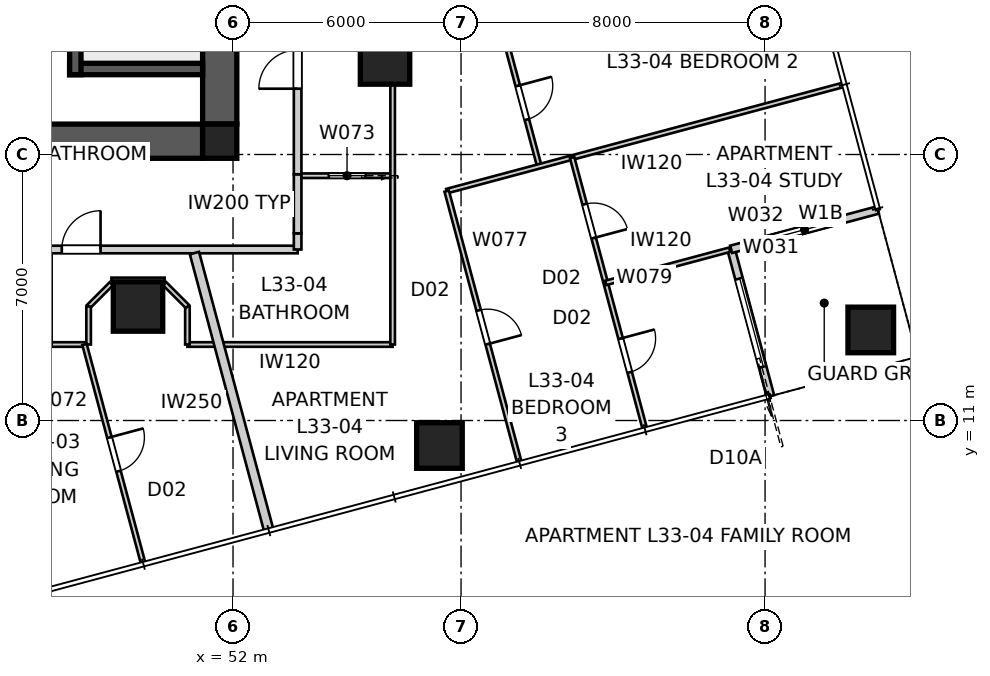
"""IFC4 building model, lengths in metres.
Left out: names, types, materials, properties, quantities, classifications, styles, units other than length and angle.
Written with IfcOpenShell. Run it as: python <this file> out.ifc"""

import sys

from ifc_helpers import new_model, si_unit, direction, frame, frame_2d, origin, origin_2d, place, context, subcontext, project, spatial, polyline, rectangle, outline, extrude, element, fill, save


model = new_model("IFC4")
c1 = context("Model", 3, precision=1e-05, world=origin(), true_north=direction((0.0, 1.0)))
c2 = subcontext(c1, "Body", "Model", "MODEL_VIEW")
j1 = project(units=[si_unit("LENGTHUNIT", "METRE"), si_unit("PLANEANGLEUNIT", "RADIAN")], contexts=[c1])
p1 = place(None, origin())
s1 = spatial("IfcSite", under=j1, at=p1, CompositionType="ELEMENT")
p2 = place(p1, origin())
s2 = spatial("IfcBuilding", under=s1, at=p2, CompositionType="ELEMENT")
p3 = place(p2, frame((0.0, 0.0, 121.8)))
s3 = spatial("IfcBuildingStorey", under=s2, at=p3, CompositionType="ELEMENT", Elevation=121.8)
p4 = place(p3, frame((51.2, 18.35, 0.0), z_axis=(0.0, 0.0, 1.0), x_axis=(-1.0, 0.0, 0.0)))
e1 = element("IfcWall", 1, at=p4, inside=s3, PredefinedType="SHEAR", context=c2, shape_type="SweptSolid", body=[
    extrude(outline(polyline([(0.0, -0.45), (22.4, -0.45), (22.4, -0.025), (22.85, -0.025), (22.85, 0.025), (22.4, 0.025), (22.4, 0.45), (0.0, 0.45), (0.0, 0.025), (-0.45, 0.025), (-0.45, -0.025), (0.0, -0.025), (0.0, -0.45)])), origin(), (0.0, 0.0, 1.0), 3.4),
])
p5 = place(p3, frame((51.65, 18.8, 0.0), z_axis=(0.0, 0.0, 1.0), x_axis=(0.0, 1.0, 0.0)))
e2 = element("IfcWall", 2, at=p5, inside=s3, PredefinedType="SHEAR", context=c2, shape_type="SweptSolid", body=[
    extrude(outline(polyline([(0.0, -0.45), (22.4, -0.45), (22.4, -0.025), (22.85, -0.025), (22.85, 0.025), (22.4, 0.025), (22.4, 0.45), (0.0, 0.45), (0.0, 0.025), (-0.45, 0.025), (-0.45, -0.025), (0.0, -0.025), (0.0, -0.45)])), origin(), (0.0, 0.0, 1.0), 3.4),
])
p6 = place(p5, frame((11.14, 0.0, 0.0)))
e3 = element("IfcOpeningElement", 3, at=p6, cuts=e2, PredefinedType="OPENING", context=c2, shape_type="SweptSolid", body=[
    extrude(rectangle(XDim=1.02, YDim=2.4, at=frame_2d((0.51, 1.2))), frame((0.0, 0.46, 0.0), z_axis=(0.0, -1.0, 0.0), x_axis=(1.0, 0.0, 0.0)), (0.0, 0.0, 1.0), 0.92),
])
p7 = place(p3, frame((47.85, 27.8, 0.0), z_axis=(0.0, 0.0, 1.0), x_axis=(0.0, -1.0, 0.0)))
e4 = element("IfcWall", 4, at=p7, inside=s3, PredefinedType="SHEAR", context=c2, shape_type="SweptSolid", body=[
    extrude(rectangle(XDim=7.7, YDim=0.3, at=frame_2d((3.85, 0.0))), origin(), (0.0, 0.0, 1.0), 3.4),
])
p8 = place(p3, frame((51.2, 20.25, 0.0), z_axis=(0.0, 0.0, 1.0), x_axis=(-1.0, 0.0, 0.0)))
e5 = element("IfcWall", 5, at=p8, inside=s3, PredefinedType="SHEAR", context=c2, shape_type="SweptSolid", body=[
    extrude(rectangle(XDim=3.5, YDim=0.3, at=frame_2d((1.75, 0.0))), origin(), (0.0, 0.0, 1.0), 3.4),
])
p9 = place(p3, frame((51.65, 18.35, 0.0), z_axis=(0.0, 0.0, 1.0), x_axis=(1.0, 0.0, 0.0)))
e6 = element("IfcColumn", 6, at=p9, inside=s3, PredefinedType="COLUMN", context=c2, shape_type="SweptSolid", body=[
    extrude(rectangle(XDim=0.9, YDim=0.9, at=origin_2d()), origin(), (0.0, 0.0, 1.0), 3.4),
])
for number, where, z_axis, x_axis in (
    (7, (57.432, 10.342, 0.0), (0.0, 0.0, 1.0), (1.0, 0.0, 0.0)),
    (8, (68.781, 13.383, 0.0), (0.0, 0.0, 1.0), (1.0, 0.0, 0.0)),
):
    element("IfcColumn", number, at=place(p3, frame(where, z_axis=z_axis, x_axis=x_axis)), inside=s3, PredefinedType="COLUMN", context=c2, shape_type="SweptSolid", body=[
        extrude(rectangle(XDim=1.2, YDim=1.2, at=origin_2d()), origin(), (0.0, 0.0, 1.0), 3.4),
    ])
for number, where, z_axis, x_axis in (
    (9, (49.5, 14.0, 0.0), (0.0, 0.0, 1.0), (1.0, 0.0, 0.0)),
    (10, (56.0, 20.5, 0.0), (0.0, 0.0, 1.0), (1.0, 0.0, 0.0)),
):
    element("IfcColumn", number, at=place(p3, frame(where, z_axis=z_axis, x_axis=x_axis)), inside=s3, PredefinedType="COLUMN", context=c2, shape_type="SweptSolid", body=[
        extrude(rectangle(XDim=1.3, YDim=1.3, at=origin_2d()), origin(), (0.0, 0.0, 1.0), 3.4),
    ])
p10 = place(p3, frame((66.143, 11.641, 0.0), z_axis=(0.0, 0.0, 1.0), x_axis=(-0.258843877716, 0.965919172068, 0.0)))
e11 = element("IfcWall", 11, at=p10, inside=s3, PredefinedType="SOLIDWALL", context=c2, shape_type="SweptSolid", body=[
    extrude(rectangle(XDim=4.0, YDim=0.2, at=frame_2d((2.0, 0.0))), origin(), (0.0, 0.0, 1.0), 3.25),
])
p11 = place(p10, frame((0.8, 0.0, 0.0)))
e12 = element("IfcOpeningElement", 12, at=p11, cuts=e11, PredefinedType="OPENING", context=c2, shape_type="SweptSolid", body=[
    extrude(rectangle(XDim=2.4, YDim=2.1, at=frame_2d((1.2, 1.05))), frame((0.0, 0.11, 0.0), z_axis=(0.0, -1.0, 0.0), x_axis=(1.0, 0.0, 0.0)), (0.0, 0.0, 1.0), 0.22),
])
p12 = place(p3, frame((65.107, 15.504, 0.0), z_axis=(0.0, 0.0, 1.0), x_axis=(0.965934430412, 0.258786931944, 0.0)))
e13 = element("IfcWall", 13, at=p12, inside=s3, PredefinedType="SOLIDWALL", context=c2, shape_type="SweptSolid", body=[
    extrude(rectangle(XDim=4.0, YDim=0.2, at=frame_2d((2.0, 0.0))), origin(), (0.0, 0.0, 1.0), 3.25),
])
p13 = place(p12, frame((1.0, 0.0, 0.45)))
e14 = element("IfcOpeningElement", 14, at=p13, cuts=e13, PredefinedType="OPENING", context=c2, shape_type="SweptSolid", body=[
    extrude(rectangle(XDim=2.0, YDim=1.8, at=frame_2d((1.0, 0.9))), frame((0.0, 0.11, 0.0), z_axis=(0.0, -1.0, 0.0), x_axis=(1.0, 0.0, 0.0)), (0.0, 0.0, 1.0), 0.22),
])
p14 = place(p3, frame((25.5, 15.5, 0.0), z_axis=(0.0, 0.0, 1.0), x_axis=(1.0, 0.0, 0.0)))
e15 = element("IfcWall", 15, at=p14, inside=s3, PredefinedType="PARTITIONING", context=c2, shape_type="SweptSolid", body=[
    extrude(rectangle(XDim=28.2, YDim=0.2, at=frame_2d((14.1, 0.0))), origin(), (0.0, 0.0, 1.0), 3.25),
])
p15 = place(p14, frame((2.244, 0.0, 0.0)))
e16 = element("IfcOpeningElement", 16, at=p15, cuts=e15, PredefinedType="OPENING", context=c2, shape_type="SweptSolid", body=[
    extrude(rectangle(XDim=1.02, YDim=2.1, at=frame_2d((0.51, 1.05))), frame((0.0, 0.11, 0.0), z_axis=(0.0, -1.0, 0.0), x_axis=(1.0, 0.0, 0.0)), (0.0, 0.0, 1.0), 0.22),
])
p16 = place(p14, frame((9.542, 0.0, 0.0)))
e17 = element("IfcOpeningElement", 17, at=p16, cuts=e15, PredefinedType="OPENING", context=c2, shape_type="SweptSolid", body=[
    extrude(rectangle(XDim=1.02, YDim=2.34, at=frame_2d((0.51, 1.17))), frame((0.0, 0.11, 0.0), z_axis=(0.0, -1.0, 0.0), x_axis=(1.0, 0.0, 0.0)), (0.0, 0.0, 1.0), 0.22),
])
p17 = place(p14, frame((21.994, 0.0, 0.0)))
e18 = element("IfcOpeningElement", 18, at=p17, cuts=e15, PredefinedType="OPENING", context=c2, shape_type="SweptSolid", body=[
    extrude(rectangle(XDim=1.02, YDim=2.34, at=frame_2d((0.51, 1.17))), frame((0.0, 0.11, 0.0), z_axis=(0.0, -1.0, 0.0), x_axis=(1.0, 0.0, 0.0)), (0.0, 0.0, 1.0), 0.22),
])
p18 = place(p3, frame((53.7, 15.5, 0.0), z_axis=(0.0, 0.0, 1.0), x_axis=(0.0, 1.0, 0.0)))
e19 = element("IfcWall", 19, at=p18, inside=s3, PredefinedType="PARTITIONING", context=c2, shape_type="SweptSolid", body=[
    extrude(rectangle(XDim=0.426, YDim=0.2, at=frame_2d((0.213, 0.0))), origin(), (0.0, 0.0, 1.0), 3.25),
])
p19 = place(p3, frame((53.7, 15.926, 0.0), z_axis=(0.0, 0.0, 1.0), x_axis=(0.0, 1.0, 0.0)))
e20 = element("IfcWall", 20, at=p19, inside=s3, PredefinedType="PARTITIONING", context=c2, shape_type="SweptSolid", body=[
    extrude(rectangle(XDim=1.554, YDim=0.2, at=frame_2d((0.777, 0.0))), origin(), (0.0, 0.0, 1.0), 2.722),
])
p20 = place(p3, frame((53.7, 17.48, 0.0), z_axis=(0.0, 0.0, 1.0), x_axis=(0.0, 1.0, 0.0)))
e21 = element("IfcWall", 21, at=p20, inside=s3, PredefinedType="PARTITIONING", context=c2, shape_type="SweptSolid", body=[
    extrude(rectangle(XDim=26.22, YDim=0.2, at=frame_2d((13.11, 0.0))), origin(), (0.0, 0.0, 1.0), 3.25),
])
p21 = place(p20, frame((2.252, 0.0, 0.0)))
e22 = element("IfcOpeningElement", 22, at=p21, cuts=e21, PredefinedType="OPENING", context=c2, shape_type="SweptSolid", body=[
    extrude(rectangle(XDim=1.02, YDim=2.34, at=frame_2d((0.51, 1.17))), frame((0.0, 0.11, 0.0), z_axis=(0.0, -1.0, 0.0), x_axis=(1.0, 0.0, 0.0)), (0.0, 0.0, 1.0), 0.22),
])
p22 = place(p20, frame((7.328, 0.0, 0.0)))
e23 = element("IfcOpeningElement", 23, at=p22, cuts=e21, PredefinedType="OPENING", context=c2, shape_type="SweptSolid", body=[
    extrude(rectangle(XDim=1.02, YDim=2.34, at=frame_2d((0.51, 1.17))), frame((0.0, 0.11, 0.0), z_axis=(0.0, -1.0, 0.0), x_axis=(1.0, 0.0, 0.0)), (0.0, 0.0, 1.0), 0.22),
])
p23 = place(p3, frame((52.942, 8.104, 0.0), z_axis=(0.0, 0.0, 1.0), x_axis=(-0.258822171171, 0.965924988656, 0.0)))
e24 = element("IfcWall", 24, at=p23, inside=s3, PredefinedType="PARTITIONING", context=c2, shape_type="SweptSolid", body=[
    extrude(rectangle(XDim=7.56, YDim=0.25, at=frame_2d((3.78, 0.0))), origin(), (0.0, 0.0, 1.0), 3.25),
])
p24 = place(p3, frame((48.144, 13.0, 0.0), z_axis=(0.0, 0.0, 1.0), x_axis=(-1.0, 0.0, 0.0)))
e25 = element("IfcWall", 25, at=p24, inside=s3, PredefinedType="PARTITIONING", context=c2, shape_type="SweptSolid", body=[
    extrude(rectangle(XDim=7.012, YDim=0.12, at=frame_2d((3.506, 0.0))), origin(), (0.0, 0.0, 1.0), 2.55),
])
p25 = place(p24, frame((1.803, 0.0, 0.0)))
e26 = element("IfcOpeningElement", 26, at=p25, cuts=e25, PredefinedType="OPENING", context=c2, shape_type="SweptSolid", body=[
    extrude(rectangle(XDim=0.96, YDim=2.1, at=frame_2d((0.48, 1.05))), frame((0.0, 0.07, 0.0), z_axis=(0.0, -1.0, 0.0), x_axis=(1.0, 0.0, 0.0)), (0.0, 0.0, 1.0), 0.14),
])
p26 = place(p24, frame((4.82, 0.0, 0.0)))
e27 = element("IfcOpeningElement", 27, at=p26, cuts=e25, PredefinedType="OPENING", context=c2, shape_type="SweptSolid", body=[
    extrude(rectangle(XDim=0.96, YDim=2.1, at=frame_2d((0.48, 1.05))), frame((0.0, 0.07, 0.0), z_axis=(0.0, -1.0, 0.0), x_axis=(1.0, 0.0, 0.0)), (0.0, 0.0, 1.0), 0.14),
])
p27 = place(p3, frame((56.2, 13.0, 0.0), z_axis=(0.0, 0.0, 1.0), x_axis=(-1.0, 0.0, 0.0)))
e28 = element("IfcWall", 28, at=p27, inside=s3, PredefinedType="PARTITIONING", context=c2, shape_type="SweptSolid", body=[
    extrude(rectangle(XDim=5.4, YDim=0.12, at=frame_2d((2.7, 0.0))), origin(), (0.0, 0.0, 1.0), 3.25),
])
p28 = place(p3, frame((50.8, 13.0, 0.0), z_axis=(0.0, 0.0, 1.0), x_axis=(0.0, 1.0, 0.0)))
e29 = element("IfcWall", 29, at=p28, inside=s3, PredefinedType="PARTITIONING", context=c2, shape_type="SweptSolid", body=[
    extrude(rectangle(XDim=1.0, YDim=0.12, at=frame_2d((0.5, 0.0))), origin(), (0.0, 0.0, 1.0), 3.25),
])
p29 = place(p3, frame((50.8, 14.0, 0.0), z_axis=(0.0, 0.0, 1.0), x_axis=(-0.707106781187, 0.707106781187, 0.0)))
e30 = element("IfcWall", 30, at=p29, inside=s3, PredefinedType="PARTITIONING", context=c2, shape_type="SweptSolid", body=[
    extrude(rectangle(XDim=0.849, YDim=0.12, at=frame_2d((0.424, 0.0))), origin(), (0.0, 0.0, 1.0), 3.25),
])
p30 = place(p3, frame((50.2, 14.7, 0.0), z_axis=(0.0, 0.0, 1.0), x_axis=(-1.0, 0.0, 0.0)))
e31 = element("IfcWall", 31, at=p30, inside=s3, PredefinedType="PARTITIONING", context=c2, shape_type="SweptSolid", body=[
    extrude(rectangle(XDim=1.4, YDim=0.12, at=frame_2d((0.7, 0.0))), origin(), (0.0, 0.0, 1.0), 3.25),
])
p31 = place(p3, frame((48.8, 14.6, 0.0), z_axis=(0.0, 0.0, 1.0), x_axis=(-0.707106781187, -0.707106781187, 0.0)))
e32 = element("IfcWall", 32, at=p31, inside=s3, PredefinedType="PARTITIONING", context=c2, shape_type="SweptSolid", body=[
    extrude(rectangle(XDim=0.849, YDim=0.12, at=frame_2d((0.424, 0.0))), origin(), (0.0, 0.0, 1.0), 3.25),
])
p32 = place(p3, frame((48.2, 14.0, 0.0), z_axis=(0.0, 0.0, 1.0), x_axis=(0.0, -1.0, 0.0)))
e33 = element("IfcWall", 33, at=p32, inside=s3, PredefinedType="PARTITIONING", context=c2, shape_type="SweptSolid", body=[
    extrude(rectangle(XDim=1.0, YDim=0.12, at=frame_2d((0.5, 0.0))), origin(), (0.0, 0.0, 1.0), 3.25),
])
p33 = place(p3, frame((48.092, 13.0, 0.0), z_axis=(0.0, 0.0, 1.0), x_axis=(0.258812722515, -0.965927520399, 0.0)))
e34 = element("IfcWall", 34, at=p33, inside=s3, PredefinedType="PARTITIONING", context=c2, shape_type="SweptSolid", body=[
    extrude(rectangle(XDim=5.945, YDim=0.12, at=frame_2d((2.972, 0.0))), origin(), (0.0, 0.0, 1.0), 3.25),
])
p34 = place(p33, frame((2.532, 0.0, 0.0)))
e35 = element("IfcOpeningElement", 35, at=p34, cuts=e34, PredefinedType="OPENING", context=c2, shape_type="SweptSolid", body=[
    extrude(rectangle(XDim=0.92, YDim=2.34, at=frame_2d((0.46, 1.17))), frame((0.0, 0.07, 0.0), z_axis=(0.0, -1.0, 0.0), x_axis=(1.0, 0.0, 0.0)), (0.0, 0.0, 1.0), 0.14),
])
p35 = place(p3, frame((56.2, 17.442, 0.0), z_axis=(0.0, 0.0, 1.0), x_axis=(-1.0, 0.0, 0.0)))
e36 = element("IfcWall", 36, at=p35, inside=s3, PredefinedType="PARTITIONING", context=c2, shape_type="SweptSolid", body=[
    extrude(rectangle(XDim=2.4, YDim=0.12, at=frame_2d((1.2, 0.0))), origin(), (0.0, 0.0, 1.0), 3.25),
])
p36 = place(p35, frame((0.72, 0.0, 0.0)))
e37 = element("IfcOpeningElement", 37, at=p36, cuts=e36, PredefinedType="OPENING", context=c2, shape_type="SweptSolid", body=[
    extrude(rectangle(XDim=0.96, YDim=2.1, at=frame_2d((0.48, 1.05))), frame((0.0, 0.07, 0.0), z_axis=(0.0, -1.0, 0.0), x_axis=(1.0, 0.0, 0.0)), (0.0, 0.0, 1.0), 0.14),
])
p37 = place(p3, frame((56.2, 46.2, 0.0), z_axis=(0.0, 0.0, 1.0), x_axis=(0.0, -1.0, 0.0)))
e38 = element("IfcWall", 38, at=p37, inside=s3, PredefinedType="PARTITIONING", context=c2, shape_type="SweptSolid", body=[
    extrude(rectangle(XDim=33.2, YDim=0.12, at=frame_2d((16.6, 0.0))), origin(), (0.0, 0.0, 1.0), 2.55),
])
p38 = place(p37, frame((23.955, 0.0, 0.0)))
e39 = element("IfcOpeningElement", 39, at=p38, cuts=e38, PredefinedType="OPENING", context=c2, shape_type="SweptSolid", body=[
    extrude(rectangle(XDim=0.92, YDim=2.34, at=frame_2d((0.46, 1.17))), frame((0.0, 0.07, 0.0), z_axis=(0.0, -1.0, 0.0), x_axis=(1.0, 0.0, 0.0)), (0.0, 0.0, 1.0), 0.14),
])
p39 = place(p37, frame((20.966, 0.0, 0.0)))
e40 = element("IfcOpeningElement", 40, at=p39, cuts=e38, PredefinedType="OPENING", context=c2, shape_type="SweptSolid", body=[
    extrude(rectangle(XDim=0.92, YDim=2.34, at=frame_2d((0.46, 1.17))), frame((0.0, 0.07, 0.0), z_axis=(0.0, -1.0, 0.0), x_axis=(1.0, 0.0, 0.0)), (0.0, 0.0, 1.0), 0.14),
])
p40 = place(p37, frame((13.174, 0.0, 0.0)))
e41 = element("IfcOpeningElement", 41, at=p40, cuts=e38, PredefinedType="OPENING", context=c2, shape_type="SweptSolid", body=[
    extrude(rectangle(XDim=0.96, YDim=2.1, at=frame_2d((0.48, 1.05))), frame((0.0, 0.07, 0.0), z_axis=(0.0, -1.0, 0.0), x_axis=(1.0, 0.0, 0.0)), (0.0, 0.0, 1.0), 0.14),
])
p41 = place(p3, frame((58.292, 24.29, 0.0), z_axis=(0.0, 0.0, 1.0), x_axis=(0.258809899302, -0.965928276853, 0.0)))
e42 = element("IfcWall", 42, at=p41, inside=s3, PredefinedType="PARTITIONING", context=c2, shape_type="SweptSolid", body=[
    extrude(rectangle(XDim=6.833, YDim=0.12, at=frame_2d((3.417, 0.0))), origin(), (0.0, 0.0, 1.0), 3.25),
])
p42 = place(p41, frame((1.273, 0.0, 0.0)))
e43 = element("IfcOpeningElement", 43, at=p42, cuts=e42, PredefinedType="OPENING", context=c2, shape_type="SweptSolid", body=[
    extrude(rectangle(XDim=0.92, YDim=2.34, at=frame_2d((0.46, 1.17))), frame((0.0, 0.07, 0.0), z_axis=(0.0, -1.0, 0.0), x_axis=(1.0, 0.0, 0.0)), (0.0, 0.0, 1.0), 0.14),
])
p43 = place(p41, frame((4.64, 0.0, 0.0)))
e44 = element("IfcOpeningElement", 44, at=p43, cuts=e42, PredefinedType="OPENING", context=c2, shape_type="SweptSolid", body=[
    extrude(rectangle(XDim=0.92, YDim=2.34, at=frame_2d((0.46, 1.17))), frame((0.0, 0.07, 0.0), z_axis=(0.0, -1.0, 0.0), x_axis=(1.0, 0.0, 0.0)), (0.0, 0.0, 1.0), 0.14),
])
p44 = place(p3, frame((68.048, 19.83, 0.0), z_axis=(0.0, 0.0, 1.0), x_axis=(-0.965921496576, -0.258835203272, 0.0)))
e45 = element("IfcWall", 45, at=p44, inside=s3, PredefinedType="PARTITIONING", context=c2, shape_type="SweptSolid", body=[
    extrude(rectangle(XDim=10.793, YDim=0.12, at=frame_2d((5.397, 0.0))), origin(), (0.0, 0.0, 1.0), 3.25),
])
p45 = place(p3, frame((57.623, 17.036, 0.0), z_axis=(0.0, 0.0, 1.0), x_axis=(0.258816044185, -0.965926630377, 0.0)))
e46 = element("IfcWall", 46, at=p45, inside=s3, PredefinedType="PARTITIONING", context=c2, shape_type="SweptSolid", body=[
    extrude(rectangle(XDim=7.377, YDim=0.12, at=frame_2d((3.688, 0.0))), origin(), (0.0, 0.0, 1.0), 2.638),
])
p46 = place(p45, frame((3.248, 0.0, 0.0)))
e47 = element("IfcOpeningElement", 47, at=p46, cuts=e46, PredefinedType="OPENING", context=c2, shape_type="SweptSolid", body=[
    extrude(rectangle(XDim=0.92, YDim=2.34, at=frame_2d((0.46, 1.17))), frame((0.0, 0.07, 0.0), z_axis=(0.0, -1.0, 0.0), x_axis=(1.0, 0.0, 0.0)), (0.0, 0.0, 1.0), 0.14),
])
p47 = place(p3, frame((60.923, 17.92, 0.0), z_axis=(0.0, 0.0, 1.0), x_axis=(0.258846923464, -0.965918355874, 0.0)))
e48 = element("IfcWall", 48, at=p47, inside=s3, PredefinedType="PARTITIONING", context=c2, shape_type="SweptSolid", body=[
    extrude(rectangle(XDim=7.377, YDim=0.12, at=frame_2d((3.688, 0.0))), origin(), (0.0, 0.0, 1.0), 3.25),
])
p48 = place(p47, frame((4.932, 0.0, 0.0)))
e49 = element("IfcOpeningElement", 49, at=p48, cuts=e48, PredefinedType="OPENING", context=c2, shape_type="SweptSolid", body=[
    extrude(rectangle(XDim=0.92, YDim=2.34, at=frame_2d((0.46, 1.17))), frame((0.0, 0.07, 0.0), z_axis=(0.0, -1.0, 0.0), x_axis=(1.0, 0.0, 0.0)), (0.0, 0.0, 1.0), 0.14),
])
p49 = place(p47, frame((1.273, 0.0, 0.0)))
e50 = element("IfcOpeningElement", 50, at=p49, cuts=e48, PredefinedType="OPENING", context=c2, shape_type="SweptSolid", body=[
    extrude(rectangle(XDim=0.92, YDim=2.34, at=frame_2d((0.46, 1.17))), frame((0.0, 0.07, 0.0), z_axis=(0.0, -1.0, 0.0), x_axis=(1.0, 0.0, 0.0)), (0.0, 0.0, 1.0), 0.14),
])
p50 = place(p3, frame((65.069, 15.494, 0.0), z_axis=(0.0, 0.0, 1.0), x_axis=(-0.96593546512, -0.258783069815, 0.0)))
e51 = element("IfcWall", 51, at=p50, inside=s3, PredefinedType="PARTITIONING", context=c2, shape_type="SweptSolid", body=[
    extrude(rectangle(XDim=3.376, YDim=0.12, at=frame_2d((1.688, 0.0))), origin(), (0.0, 0.0, 1.0), 3.25),
])
p51 = place(p11, origin())
e52 = element("IfcDoor", 52, at=p51, inside=s3, OperationType="SLIDING_TO_LEFT", PredefinedType="DOOR", context=c2, shape_type="SweptSolid", body=[
    extrude(rectangle(XDim=2.4, YDim=2.1, at=frame_2d((1.2, 1.05))), frame((0.0, 0.025, 0.0), z_axis=(0.0, -1.0, 0.0), x_axis=(1.0, 0.0, 0.0)), (0.0, 0.0, 1.0), 0.05),
])
fill(e12, e52)
p52 = place(p13, origin())
e53 = element("IfcWindow", 53, at=p52, inside=s3, PartitioningType="SINGLE_PANEL", PredefinedType="WINDOW", context=c2, shape_type="SweptSolid", body=[
    extrude(rectangle(XDim=2.0, YDim=1.8, at=frame_2d((1.0, 0.9))), frame((0.0, 0.03, 0.0), z_axis=(0.0, -1.0, 0.0), x_axis=(1.0, 0.0, 0.0)), (0.0, 0.0, 1.0), 0.06),
])
fill(e14, e53)
p53 = place(p21, origin())
e54 = element("IfcDoor", 54, at=p53, inside=s3, OperationType="SINGLE_SWING_LEFT", PredefinedType="DOOR", context=c2, shape_type="SweptSolid", body=[
    extrude(rectangle(XDim=1.02, YDim=2.34, at=frame_2d((0.51, 1.17))), frame((0.0, 0.025, 0.0), z_axis=(0.0, -1.0, 0.0), x_axis=(1.0, 0.0, 0.0)), (0.0, 0.0, 1.0), 0.05),
])
fill(e22, e54)
p54 = place(p17, origin())
e55 = element("IfcDoor", 55, at=p54, inside=s3, OperationType="SINGLE_SWING_RIGHT", PredefinedType="DOOR", context=c2, shape_type="SweptSolid", body=[
    extrude(rectangle(XDim=1.02, YDim=2.34, at=frame_2d((0.51, 1.17))), frame((0.0, 0.025, 0.0), z_axis=(0.0, -1.0, 0.0), x_axis=(1.0, 0.0, 0.0)), (0.0, 0.0, 1.0), 0.05),
])
fill(e18, e55)
p55 = place(p36, origin())
e56 = element("IfcDoor", 56, at=p55, inside=s3, OperationType="SLIDING_TO_LEFT", PredefinedType="DOOR", context=c2, shape_type="SweptSolid", body=[
    extrude(rectangle(XDim=0.96, YDim=2.1, at=frame_2d((0.48, 1.05))), frame((0.0, 0.025, 0.0), z_axis=(0.0, -1.0, 0.0), x_axis=(1.0, 0.0, 0.0)), (0.0, 0.0, 1.0), 0.05),
])
fill(e37, e56)
p56 = place(p46, origin())
e57 = element("IfcDoor", 57, at=p56, inside=s3, OperationType="SINGLE_SWING_RIGHT", PredefinedType="DOOR", context=c2, shape_type="SweptSolid", body=[
    extrude(rectangle(XDim=0.92, YDim=2.34, at=frame_2d((0.46, 1.17))), frame((0.0, 0.025, 0.0), z_axis=(0.0, -1.0, 0.0), x_axis=(1.0, 0.0, 0.0)), (0.0, 0.0, 1.0), 0.05),
])
fill(e47, e57)
p57 = place(p43, origin())
e58 = element("IfcDoor", 58, at=p57, inside=s3, OperationType="SINGLE_SWING_LEFT", PredefinedType="DOOR", context=c2, shape_type="SweptSolid", body=[
    extrude(rectangle(XDim=0.92, YDim=2.34, at=frame_2d((0.46, 1.17))), frame((0.0, 0.025, 0.0), z_axis=(0.0, -1.0, 0.0), x_axis=(1.0, 0.0, 0.0)), (0.0, 0.0, 1.0), 0.05),
])
fill(e44, e58)
p58 = place(p34, origin())
e59 = element("IfcDoor", 59, at=p58, inside=s3, OperationType="SINGLE_SWING_LEFT", PredefinedType="DOOR", context=c2, shape_type="SweptSolid", body=[
    extrude(rectangle(XDim=0.92, YDim=2.34, at=frame_2d((0.46, 1.17))), frame((0.0, 0.025, 0.0), z_axis=(0.0, -1.0, 0.0), x_axis=(1.0, 0.0, 0.0)), (0.0, 0.0, 1.0), 0.05),
])
fill(e35, e59)
p59 = place(p48, origin())
e60 = element("IfcDoor", 60, at=p59, inside=s3, OperationType="SINGLE_SWING_LEFT", PredefinedType="DOOR", context=c2, shape_type="SweptSolid", body=[
    extrude(rectangle(XDim=0.92, YDim=2.34, at=frame_2d((0.46, 1.17))), frame((0.0, 0.025, 0.0), z_axis=(0.0, -1.0, 0.0), x_axis=(1.0, 0.0, 0.0)), (0.0, 0.0, 1.0), 0.05),
])
fill(e49, e60)
p60 = place(p49, origin())
e61 = element("IfcDoor", 61, at=p60, inside=s3, OperationType="SINGLE_SWING_RIGHT", PredefinedType="DOOR", context=c2, shape_type="SweptSolid", body=[
    extrude(rectangle(XDim=0.92, YDim=2.34, at=frame_2d((0.46, 1.17))), frame((0.0, 0.025, 0.0), z_axis=(0.0, -1.0, 0.0), x_axis=(1.0, 0.0, 0.0)), (0.0, 0.0, 1.0), 0.05),
])
fill(e50, e61)
save(model, sys.argv[1])
